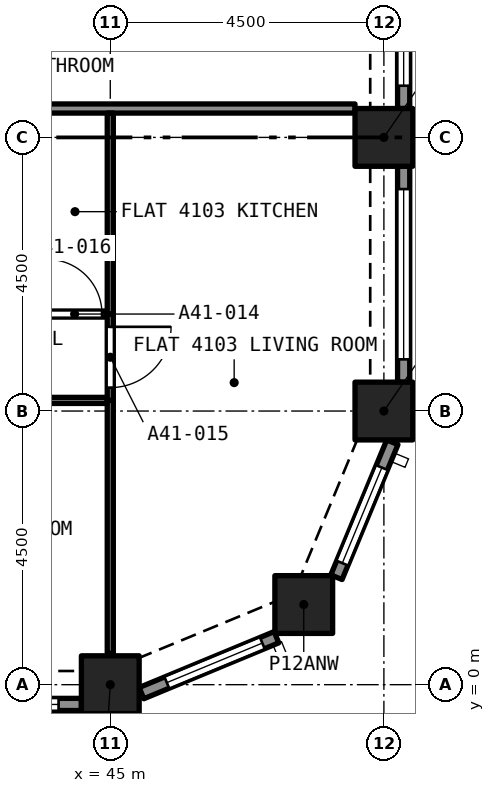
"""IFC4 building model, lengths in metres.
Left out: names, types, materials, properties, quantities, classifications, styles, units other than length and angle.
Written with IfcOpenShell. Run it as: python <this file> out.ifc"""

import sys

from ifc_helpers import new_model, si_unit, direction, frame, frame_2d, origin, origin_2d, place, context, subcontext, project, spatial, rectangle, extrude, element, fill, save


model = new_model("IFC4")
c1 = context("Model", 3, precision=1e-05, world=origin(), true_north=direction((0.0, 1.0)))
c2 = subcontext(c1, "Body", "Model", "MODEL_VIEW")
j1 = project(units=[si_unit("LENGTHUNIT", "METRE"), si_unit("PLANEANGLEUNIT", "RADIAN")], contexts=[c1])
p1 = place(None, origin())
s1 = spatial("IfcSite", under=j1, at=p1, CompositionType="ELEMENT")
p2 = place(p1, origin())
s2 = spatial("IfcBuilding", under=s1, at=p2, CompositionType="ELEMENT")
p3 = place(p2, frame((0.0, 0.0, 146.2)))
s3 = spatial("IfcBuildingStorey", under=s2, at=p3, CompositionType="ELEMENT", Elevation=146.2)
for number, where, z_axis, x_axis in (
    (1, (45.0, 0.0, 0.0), (0.0, 0.0, 1.0), (1.0, 0.0, 0.0)),
    (2, (48.182, 1.318, 0.0), (0.0, 0.0, 1.0), (1.0, 0.0, 0.0)),
    (3, (49.5, 4.5, 0.0), (0.0, 0.0, 1.0), (1.0, 0.0, 0.0)),
    (4, (49.5, 9.0, 0.0), (0.0, 0.0, 1.0), (1.0, 0.0, 0.0)),
):
    element("IfcColumn", number, at=place(p3, frame(where, z_axis=z_axis, x_axis=x_axis)), inside=s3, PredefinedType="COLUMN", context=c2, shape_type="SweptSolid", body=[
        extrude(rectangle(XDim=0.95, YDim=0.95, at=origin_2d()), origin(), (0.0, 0.0, 1.0), 4.4),
    ])
p4 = place(p3, frame((44.525, -0.325, 0.0), z_axis=(0.0, 0.0, 1.0), x_axis=(-1.0, 0.0, 0.0)))
e5 = element("IfcWall", 5, at=p4, inside=s3, PredefinedType="SOLIDWALL", context=c2, shape_type="SweptSolid", body=[
    extrude(rectangle(XDim=3.55, YDim=0.2, at=frame_2d((1.775, 0.0))), origin(), (0.0, 0.0, 1.0), 4.4),
])
p5 = place(p4, frame((0.375, 0.0, 0.45)))
e6 = element("IfcOpeningElement", 6, at=p5, cuts=e5, PredefinedType="OPENING", context=c2, shape_type="SweptSolid", body=[
    extrude(rectangle(XDim=2.8, YDim=2.55, at=frame_2d((1.4, 1.275))), frame((0.0, 0.11, 0.0), z_axis=(0.0, -1.0, 0.0), x_axis=(1.0, 0.0, 0.0)), (0.0, 0.0, 1.0), 0.22),
])
p6 = place(p3, frame((47.733, 0.78, 0.0), z_axis=(0.0, 0.0, 1.0), x_axis=(-0.923880599843, -0.382680855588, 0.0)))
e7 = element("IfcWall", 7, at=p6, inside=s3, PredefinedType="SOLIDWALL", context=c2, shape_type="SweptSolid", body=[
    extrude(rectangle(XDim=2.403, YDim=0.2, at=frame_2d((1.201, 0.0))), origin(), (0.0, 0.0, 1.0), 4.4),
])
p7 = place(p6, frame((0.251, 0.0, 0.45)))
e8 = element("IfcOpeningElement", 8, at=p7, cuts=e7, PredefinedType="OPENING", context=c2, shape_type="SweptSolid", body=[
    extrude(rectangle(XDim=1.7, YDim=2.55, at=frame_2d((0.85, 1.275))), frame((0.0, 0.11, 0.0), z_axis=(0.0, -1.0, 0.0), x_axis=(1.0, 0.0, 0.0)), (0.0, 0.0, 1.0), 0.22),
])
p8 = place(p3, frame((49.639, 3.987, 0.0), z_axis=(0.0, 0.0, 1.0), x_axis=(-0.382680855588, -0.923880599843, 0.0)))
e9 = element("IfcWall", 9, at=p8, inside=s3, PredefinedType="SOLIDWALL", context=c2, shape_type="SweptSolid", body=[
    extrude(rectangle(XDim=2.403, YDim=0.2, at=frame_2d((1.201, 0.0))), origin(), (0.0, 0.0, 1.0), 4.4),
])
p9 = place(p8, frame((0.451, 0.0, 0.45)))
e10 = element("IfcOpeningElement", 10, at=p9, cuts=e9, PredefinedType="OPENING", context=c2, shape_type="SweptSolid", body=[
    extrude(rectangle(XDim=1.7, YDim=2.55, at=frame_2d((0.85, 1.275))), frame((0.0, 0.11, 0.0), z_axis=(0.0, -1.0, 0.0), x_axis=(1.0, 0.0, 0.0)), (0.0, 0.0, 1.0), 0.22),
])
p10 = place(p3, frame((49.825, 8.525, 0.0), z_axis=(0.0, 0.0, 1.0), x_axis=(0.0, -1.0, 0.0)))
e11 = element("IfcWall", 11, at=p10, inside=s3, PredefinedType="SOLIDWALL", context=c2, shape_type="SweptSolid", body=[
    extrude(rectangle(XDim=3.55, YDim=0.2, at=frame_2d((1.775, 0.0))), origin(), (0.0, 0.0, 1.0), 4.4),
])
p11 = place(p10, frame((0.375, 0.0, 0.45)))
e12 = element("IfcOpeningElement", 12, at=p11, cuts=e11, PredefinedType="OPENING", context=c2, shape_type="SweptSolid", body=[
    extrude(rectangle(XDim=2.8, YDim=2.55, at=frame_2d((1.4, 1.275))), frame((0.0, 0.11, 0.0), z_axis=(0.0, -1.0, 0.0), x_axis=(1.0, 0.0, 0.0)), (0.0, 0.0, 1.0), 0.22),
])
p12 = place(p3, frame((49.825, 13.025, 0.0), z_axis=(0.0, 0.0, 1.0), x_axis=(0.0, -1.0, 0.0)))
e13 = element("IfcWall", 13, at=p12, inside=s3, PredefinedType="SOLIDWALL", context=c2, shape_type="SweptSolid", body=[
    extrude(rectangle(XDim=3.55, YDim=0.2, at=frame_2d((1.775, 0.0))), origin(), (0.0, 0.0, 1.0), 4.4),
])
p13 = place(p12, frame((0.375, 0.0, 0.45)))
e14 = element("IfcOpeningElement", 14, at=p13, cuts=e13, PredefinedType="OPENING", context=c2, shape_type="SweptSolid", body=[
    extrude(rectangle(XDim=2.8, YDim=2.55, at=frame_2d((1.4, 1.275))), frame((0.0, 0.11, 0.0), z_axis=(0.0, -1.0, 0.0), x_axis=(1.0, 0.0, 0.0)), (0.0, 0.0, 1.0), 0.22),
])
p14 = place(p3, frame((42.85, 9.475, 0.0), z_axis=(0.0, 0.0, 1.0), x_axis=(1.0, 0.0, 0.0)))
e15 = element("IfcWall", 15, at=p14, inside=s3, PredefinedType="PARTITIONING", context=c2, shape_type="SweptSolid", body=[
    extrude(rectangle(XDim=6.175, YDim=0.15, at=frame_2d((3.087, 0.0))), origin(), (0.0, 0.0, 1.0), 4.1),
])
p15 = place(p3, frame((44.95, 4.675, 0.0), z_axis=(0.0, 0.0, 1.0), x_axis=(-1.0, 0.0, 0.0)))
e16 = element("IfcWall", 16, at=p15, inside=s3, PredefinedType="PARTITIONING", context=c2, shape_type="SweptSolid", body=[
    extrude(rectangle(XDim=4.35, YDim=0.1, at=frame_2d((2.175, 0.0))), origin(), (0.0, 0.0, 1.0), 4.1),
])
p16 = place(p15, frame((1.75, 0.0, 0.0)))
e17 = element("IfcOpeningElement", 17, at=p16, cuts=e16, PredefinedType="OPENING", context=c2, shape_type="SweptSolid", body=[
    extrude(rectangle(XDim=0.9, YDim=2.1, at=frame_2d((0.45, 1.05))), frame((0.0, 0.06, 0.0), z_axis=(0.0, -1.0, 0.0), x_axis=(1.0, 0.0, 0.0)), (0.0, 0.0, 1.0), 0.12),
])
p17 = place(p3, frame((45.0, 0.514, 0.0), z_axis=(0.0, 0.0, 1.0), x_axis=(0.0, 1.0, 0.0)))
e18 = element("IfcWall", 18, at=p17, inside=s3, PredefinedType="PARTITIONING", context=c2, shape_type="SweptSolid", body=[
    extrude(rectangle(XDim=4.161, YDim=0.1, at=frame_2d((2.081, 0.0))), origin(), (0.0, 0.0, 1.0), 4.1),
])
p18 = place(p3, frame((43.827, 6.095, 0.0), z_axis=(0.0, 0.0, 1.0), x_axis=(1.0, 0.0, 0.0)))
e19 = element("IfcWall", 19, at=p18, inside=s3, PredefinedType="PARTITIONING", context=c2, shape_type="SweptSolid", body=[
    extrude(rectangle(XDim=1.123, YDim=0.1, at=frame_2d((0.561, 0.0))), origin(), (0.0, 0.0, 1.0), 4.1),
])
p19 = place(p18, frame((0.136, 0.0, 0.0)))
e20 = element("IfcOpeningElement", 20, at=p19, cuts=e19, PredefinedType="OPENING", context=c2, shape_type="SweptSolid", body=[
    extrude(rectangle(XDim=0.9, YDim=2.1, at=frame_2d((0.45, 1.05))), frame((0.0, 0.06, 0.0), z_axis=(0.0, -1.0, 0.0), x_axis=(1.0, 0.0, 0.0)), (0.0, 0.0, 1.0), 0.12),
])
p20 = place(p3, frame((45.0, 6.095, 0.0), z_axis=(0.0, 0.0, 1.0), x_axis=(0.0, -1.0, 0.0)))
e21 = element("IfcWall", 21, at=p20, inside=s3, PredefinedType="PARTITIONING", context=c2, shape_type="SweptSolid", body=[
    extrude(rectangle(XDim=1.42, YDim=0.1, at=frame_2d((0.71, 0.0))), origin(), (0.0, 0.0, 1.0), 4.1),
])
p21 = place(p20, frame((0.21, 0.0, 0.0)))
e22 = element("IfcOpeningElement", 22, at=p21, cuts=e21, PredefinedType="OPENING", context=c2, shape_type="SweptSolid", body=[
    extrude(rectangle(XDim=1.0, YDim=2.1, at=frame_2d((0.5, 1.05))), frame((0.0, 0.06, 0.0), z_axis=(0.0, -1.0, 0.0), x_axis=(1.0, 0.0, 0.0)), (0.0, 0.0, 1.0), 0.12),
])
p22 = place(p3, frame((45.0, 6.095, 0.0), z_axis=(0.0, 0.0, 1.0), x_axis=(0.0, 1.0, 0.0)))
e23 = element("IfcWall", 23, at=p22, inside=s3, PredefinedType="PARTITIONING", context=c2, shape_type="SweptSolid", body=[
    extrude(rectangle(XDim=3.305, YDim=0.1, at=frame_2d((1.652, 0.0))), origin(), (0.0, 0.0, 1.0), 4.1),
])
p23 = place(p5, origin())
e24 = element("IfcWindow", 24, at=p23, inside=s3, PartitioningType="SINGLE_PANEL", PredefinedType="WINDOW", context=c2, shape_type="SweptSolid", body=[
    extrude(rectangle(XDim=2.8, YDim=2.55, at=frame_2d((1.4, 1.275))), frame((0.0, 0.03, 0.0), z_axis=(0.0, -1.0, 0.0), x_axis=(1.0, 0.0, 0.0)), (0.0, 0.0, 1.0), 0.06),
])
fill(e6, e24)
p24 = place(p7, origin())
e25 = element("IfcWindow", 25, at=p24, inside=s3, PartitioningType="SINGLE_PANEL", PredefinedType="WINDOW", context=c2, shape_type="SweptSolid", body=[
    extrude(rectangle(XDim=1.7, YDim=2.55, at=frame_2d((0.85, 1.275))), frame((0.0, 0.03, 0.0), z_axis=(0.0, -1.0, 0.0), x_axis=(1.0, 0.0, 0.0)), (0.0, 0.0, 1.0), 0.06),
])
fill(e8, e25)
p25 = place(p9, origin())
e26 = element("IfcWindow", 26, at=p25, inside=s3, PartitioningType="SINGLE_PANEL", PredefinedType="WINDOW", context=c2, shape_type="SweptSolid", body=[
    extrude(rectangle(XDim=1.7, YDim=2.55, at=frame_2d((0.85, 1.275))), frame((0.0, 0.03, 0.0), z_axis=(0.0, -1.0, 0.0), x_axis=(1.0, 0.0, 0.0)), (0.0, 0.0, 1.0), 0.06),
])
fill(e10, e26)
p26 = place(p11, origin())
e27 = element("IfcWindow", 27, at=p26, inside=s3, PartitioningType="SINGLE_PANEL", PredefinedType="WINDOW", context=c2, shape_type="SweptSolid", body=[
    extrude(rectangle(XDim=2.8, YDim=2.55, at=frame_2d((1.4, 1.275))), frame((0.0, 0.03, 0.0), z_axis=(0.0, -1.0, 0.0), x_axis=(1.0, 0.0, 0.0)), (0.0, 0.0, 1.0), 0.06),
])
fill(e12, e27)
p27 = place(p13, origin())
e28 = element("IfcWindow", 28, at=p27, inside=s3, PartitioningType="SINGLE_PANEL", PredefinedType="WINDOW", context=c2, shape_type="SweptSolid", body=[
    extrude(rectangle(XDim=2.8, YDim=2.55, at=frame_2d((1.4, 1.275))), frame((0.0, 0.03, 0.0), z_axis=(0.0, -1.0, 0.0), x_axis=(1.0, 0.0, 0.0)), (0.0, 0.0, 1.0), 0.06),
])
fill(e14, e28)
p28 = place(p19, origin())
e29 = element("IfcDoor", 29, at=p28, inside=s3, OperationType="SINGLE_SWING_RIGHT", PredefinedType="DOOR", context=c2, shape_type="SweptSolid", body=[
    extrude(rectangle(XDim=0.9, YDim=2.1, at=frame_2d((0.45, 1.05))), frame((0.0, 0.025, 0.0), z_axis=(0.0, -1.0, 0.0), x_axis=(1.0, 0.0, 0.0)), (0.0, 0.0, 1.0), 0.05),
])
fill(e20, e29)
p29 = place(p21, origin())
e30 = element("IfcDoor", 30, at=p29, inside=s3, OperationType="SINGLE_SWING_RIGHT", PredefinedType="DOOR", context=c2, shape_type="SweptSolid", body=[
    extrude(rectangle(XDim=1.0, YDim=2.1, at=frame_2d((0.5, 1.05))), frame((0.0, 0.025, 0.0), z_axis=(0.0, -1.0, 0.0), x_axis=(1.0, 0.0, 0.0)), (0.0, 0.0, 1.0), 0.05),
])
fill(e22, e30)
save(model, sys.argv[1])
